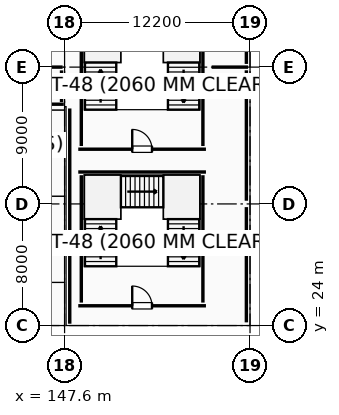
"""IFC4 building model, lengths in metres.
Left out: names, types, materials, properties, quantities, classifications, styles, units other than length and angle.
Written with IfcOpenShell. Run it as: python <this file> out.ifc"""

import sys

from ifc_helpers import new_model, si_unit, direction, frame, frame_2d, origin, origin_2d, place, context, subcontext, project, spatial, rectangle, i_section, extrude, element, fill, save


model = new_model("IFC4")
c1 = context("Model", 3, precision=1e-05, world=origin(), true_north=direction((0.0, 1.0)))
c2 = subcontext(c1, "Body", "Model", "MODEL_VIEW")
j1 = project(units=[si_unit("LENGTHUNIT", "METRE"), si_unit("PLANEANGLEUNIT", "RADIAN")], contexts=[c1])
p1 = place(None, origin())
s1 = spatial("IfcSite", under=j1, at=p1, CompositionType="ELEMENT")
p2 = place(p1, origin())
s2 = spatial("IfcBuilding", under=s1, at=p2, CompositionType="ELEMENT")
p3 = place(p2, frame((0.0, 0.0, 10.2)))
s3 = spatial("IfcBuildingStorey", under=s2, at=p3, CompositionType="ELEMENT", Elevation=10.2)
for number, where, z_axis, x_axis in (
    (1, (147.6, 24.0, 0.0), (0.0, 0.0, 1.0), (1.0, 0.0, 0.0)),
    (2, (147.6, 32.0, 0.0), (0.0, 0.0, 1.0), (1.0, 0.0, 0.0)),
    (3, (147.6, 41.0, 0.0), (0.0, 0.0, 1.0), (1.0, 0.0, 0.0)),
    (4, (159.8, 24.0, 0.0), (0.0, 0.0, 1.0), (1.0, 0.0, 0.0)),
    (5, (159.8, 32.0, 0.0), (0.0, 0.0, 1.0), (1.0, 0.0, 0.0)),
    (6, (159.8, 41.0, 0.0), (0.0, 0.0, 1.0), (1.0, 0.0, 0.0)),
):
    element("IfcColumn", number, at=place(p3, frame(where, z_axis=z_axis, x_axis=x_axis)), inside=s3, PredefinedType="COLUMN", context=c2, shape_type="SweptSolid", body=[
        extrude(i_section(OverallWidth=0.25, OverallDepth=0.4, WebThickness=0.01, FlangeThickness=0.013, FilletRadius=0.014, at=origin_2d()), origin(), (0.0, 0.0, 1.0), 4.8),
    ])
for number, where, z_axis, x_axis in (
    (7, (151.22, 31.08, 0.0), (0.0, 0.0, 1.0), (1.0, 0.0, 0.0)),
    (8, (154.18, 31.08, 0.0), (0.0, 0.0, 1.0), (1.0, 0.0, 0.0)),
    (9, (151.22, 41.38, 0.0), (0.0, 0.0, 1.0), (1.0, 0.0, 0.0)),
    (10, (154.18, 41.38, 0.0), (0.0, 0.0, 1.0), (1.0, 0.0, 0.0)),
):
    element("IfcColumn", number, at=place(p3, frame(where, z_axis=z_axis, x_axis=x_axis)), inside=s3, PredefinedType="COLUMN", context=c2, shape_type="SweptSolid", body=[
        extrude(i_section(OverallWidth=0.25, OverallDepth=0.35, WebThickness=0.01, FlangeThickness=0.012, FilletRadius=0.012, at=origin_2d()), origin(), (0.0, 0.0, 1.0), 4.76),
    ])
for number, where, z_axis, x_axis in (
    (11, (159.56, 49.79, 0.0), (0.0, 0.0, 1.0), (0.0, -1.0, 0.0)),
    (12, (159.56, 40.79, 0.0), (0.0, 0.0, 1.0), (0.0, -1.0, 0.0)),
):
    element("IfcWall", number, at=place(p3, frame(where, z_axis=z_axis, x_axis=x_axis)), inside=s3, PredefinedType="PARAPET", context=c2, shape_type="SweptSolid", body=[
        extrude(rectangle(XDim=8.58, YDim=0.18, at=frame_2d((4.29, 0.0))), origin(), (0.0, 0.0, 1.0), 0.88),
    ])
p4 = place(p3, frame((159.56, 31.79, 0.0), z_axis=(0.0, 0.0, 1.0), x_axis=(0.0, -1.0, 0.0)))
e13 = element("IfcWall", 13, at=p4, inside=s3, PredefinedType="PARAPET", context=c2, shape_type="SweptSolid", body=[
    extrude(rectangle(XDim=7.58, YDim=0.18, at=frame_2d((3.79, 0.0))), origin(), (0.0, 0.0, 1.0), 0.88),
])
p5 = place(p3, frame((147.94, 24.12, 0.0), z_axis=(0.0, 0.0, 1.0), x_axis=(0.0, 1.0, 0.0)))
e14 = element("IfcWall", 14, at=p5, inside=s3, PredefinedType="PARAPET", context=c2, shape_type="SweptSolid", body=[
    extrude(rectangle(XDim=14.16, YDim=0.18, at=frame_2d((7.08, 0.0))), origin(), (0.0, 0.0, 1.0), 0.88),
])
p6 = place(p3, frame((147.55, 38.56, 0.0), z_axis=(0.0, 0.0, 1.0), x_axis=(-1.0, 0.0, 0.0)))
e15 = element("IfcWall", 15, at=p6, inside=s3, PredefinedType="STANDARD", context=c2, shape_type="SweptSolid", body=[
    extrude(rectangle(XDim=21.1, YDim=0.28, at=frame_2d((10.55, 0.0))), origin(), (0.0, 0.0, 1.0), 4.54),
])
p7 = place(p3, frame((148.5, 25.3, 0.0), z_axis=(0.0, 0.0, 1.0), x_axis=(1.0, 0.0, 0.0)))
e16 = element("IfcWall", 16, at=p7, inside=s3, PredefinedType="SHEAR", context=c2, shape_type="SweptSolid", body=[
    extrude(rectangle(XDim=8.4, YDim=0.4, at=frame_2d((4.2, 0.0))), origin(), (0.0, 0.0, 1.0), 4.54),
])
p8 = place(p7, frame((3.55, 0.0, 0.0)))
e17 = element("IfcOpeningElement", 17, at=p8, cuts=e16, PredefinedType="OPENING", context=c2, shape_type="SweptSolid", body=[
    extrude(rectangle(XDim=1.3, YDim=2.15, at=frame_2d((0.65, 1.075))), frame((0.0, 0.21, 0.0), z_axis=(0.0, -1.0, 0.0), x_axis=(1.0, 0.0, 0.0)), (0.0, 0.0, 1.0), 0.42),
])
p9 = place(p3, frame((156.9, 34.1, 0.0), z_axis=(0.0, 0.0, 1.0), x_axis=(-1.0, 0.0, 0.0)))
e18 = element("IfcWall", 18, at=p9, inside=s3, PredefinedType="SHEAR", context=c2, shape_type="SweptSolid", body=[
    extrude(rectangle(XDim=8.4, YDim=0.4, at=frame_2d((4.2, 0.0))), origin(), (0.0, 0.0, 1.0), 4.54),
])
for number, where, z_axis, x_axis in (
    (19, (156.7, 25.51, 0.0), (0.0, 0.0, 1.0), (0.0, 1.0, 0.0)),
    (20, (148.7, 33.89, 0.0), (0.0, 0.0, 1.0), (0.0, -1.0, 0.0)),
):
    element("IfcWall", number, at=place(p3, frame(where, z_axis=z_axis, x_axis=x_axis)), inside=s3, PredefinedType="SHEAR", context=c2, shape_type="SweptSolid", body=[
        extrude(rectangle(XDim=8.38, YDim=0.4, at=frame_2d((4.19, 0.0))), origin(), (0.0, 0.0, 1.0), 4.54),
    ])
p10 = place(p3, frame((148.5, 35.6, 0.0), z_axis=(0.0, 0.0, 1.0), x_axis=(1.0, 0.0, 0.0)))
e21 = element("IfcWall", 21, at=p10, inside=s3, PredefinedType="SHEAR", context=c2, shape_type="SweptSolid", body=[
    extrude(rectangle(XDim=8.4, YDim=0.4, at=frame_2d((4.2, 0.0))), origin(), (0.0, 0.0, 1.0), 4.54),
])
p11 = place(p10, frame((3.55, 0.0, 0.0)))
e22 = element("IfcOpeningElement", 22, at=p11, cuts=e21, PredefinedType="OPENING", context=c2, shape_type="SweptSolid", body=[
    extrude(rectangle(XDim=1.3, YDim=2.15, at=frame_2d((0.65, 1.075))), frame((0.0, 0.21, 0.0), z_axis=(0.0, -1.0, 0.0), x_axis=(1.0, 0.0, 0.0)), (0.0, 0.0, 1.0), 0.42),
])
for number, where, z_axis, x_axis in (
    (23, (156.7, 35.81, 0.0), (0.0, 0.0, 1.0), (0.0, 1.0, 0.0)),
    (24, (148.7, 44.19, 0.0), (0.0, 0.0, 1.0), (0.0, -1.0, 0.0)),
):
    element("IfcWall", number, at=place(p3, frame(where, z_axis=z_axis, x_axis=x_axis)), inside=s3, PredefinedType="SHEAR", context=c2, shape_type="SweptSolid", body=[
        extrude(rectangle(XDim=8.38, YDim=0.4, at=frame_2d((4.19, 0.0))), origin(), (0.0, 0.0, 1.0), 4.54),
    ])
p12 = place(p3, frame((135.79, 41.0, 0.0), z_axis=(0.0, 0.0, 1.0), x_axis=(1.0, 0.0, 0.0)))
e25 = element("IfcWall", 25, at=p12, inside=s3, PredefinedType="PARTITIONING", context=c2, shape_type="SweptSolid", body=[
    extrude(rectangle(XDim=11.681, YDim=0.25, at=frame_2d((5.84, 0.0))), origin(), (0.0, 0.0, 1.0), 3.97),
])
p13 = place(p12, frame((4.783, 0.0, 0.0)))
e26 = element("IfcOpeningElement", 26, at=p13, cuts=e25, PredefinedType="OPENING", context=c2, shape_type="SweptSolid", body=[
    extrude(rectangle(XDim=1.9, YDim=2.35, at=frame_2d((0.95, 1.175))), frame((0.0, 0.135, 0.0), z_axis=(0.0, -1.0, 0.0), x_axis=(1.0, 0.0, 0.0)), (0.0, 0.0, 1.0), 0.27),
])
p14 = place(p3, frame((147.4, 40.785, 0.0), z_axis=(0.0, 0.0, 1.0), x_axis=(0.0, -1.0, 0.0)))
e27 = element("IfcWall", 27, at=p14, inside=s3, PredefinedType="PARTITIONING", context=c2, shape_type="SweptSolid", body=[
    extrude(rectangle(XDim=2.081, YDim=0.25, at=frame_2d((1.041, 0.0))), origin(), (0.0, 0.0, 1.0), 4.02),
])
p15 = place(p3, frame((157.275, 41.0, 0.0), z_axis=(0.0, 0.0, 1.0), x_axis=(1.0, 0.0, 0.0)))
e28 = element("IfcWall", 28, at=p15, inside=s3, PredefinedType="MOVABLE", context=c2, shape_type="SweptSolid", body=[
    extrude(rectangle(XDim=2.396, YDim=0.11, at=frame_2d((1.198, 0.0))), origin(), (0.0, 0.0, 1.0), 4.53),
])
p16 = place(p8, origin())
e29 = element("IfcDoor", 29, at=p16, inside=s3, OperationType="SINGLE_SWING_LEFT", PredefinedType="DOOR", context=c2, shape_type="SweptSolid", body=[
    extrude(rectangle(XDim=1.3, YDim=2.15, at=frame_2d((0.65, 1.075))), frame((0.0, 0.025, 0.0), z_axis=(0.0, -1.0, 0.0), x_axis=(1.0, 0.0, 0.0)), (0.0, 0.0, 1.0), 0.05),
])
fill(e17, e29)
p17 = place(p11, origin())
e30 = element("IfcDoor", 30, at=p17, inside=s3, OperationType="SINGLE_SWING_LEFT", PredefinedType="DOOR", context=c2, shape_type="SweptSolid", body=[
    extrude(rectangle(XDim=1.3, YDim=2.15, at=frame_2d((0.65, 1.075))), frame((0.0, 0.025, 0.0), z_axis=(0.0, -1.0, 0.0), x_axis=(1.0, 0.0, 0.0)), (0.0, 0.0, 1.0), 0.05),
])
fill(e22, e30)
save(model, sys.argv[1])
